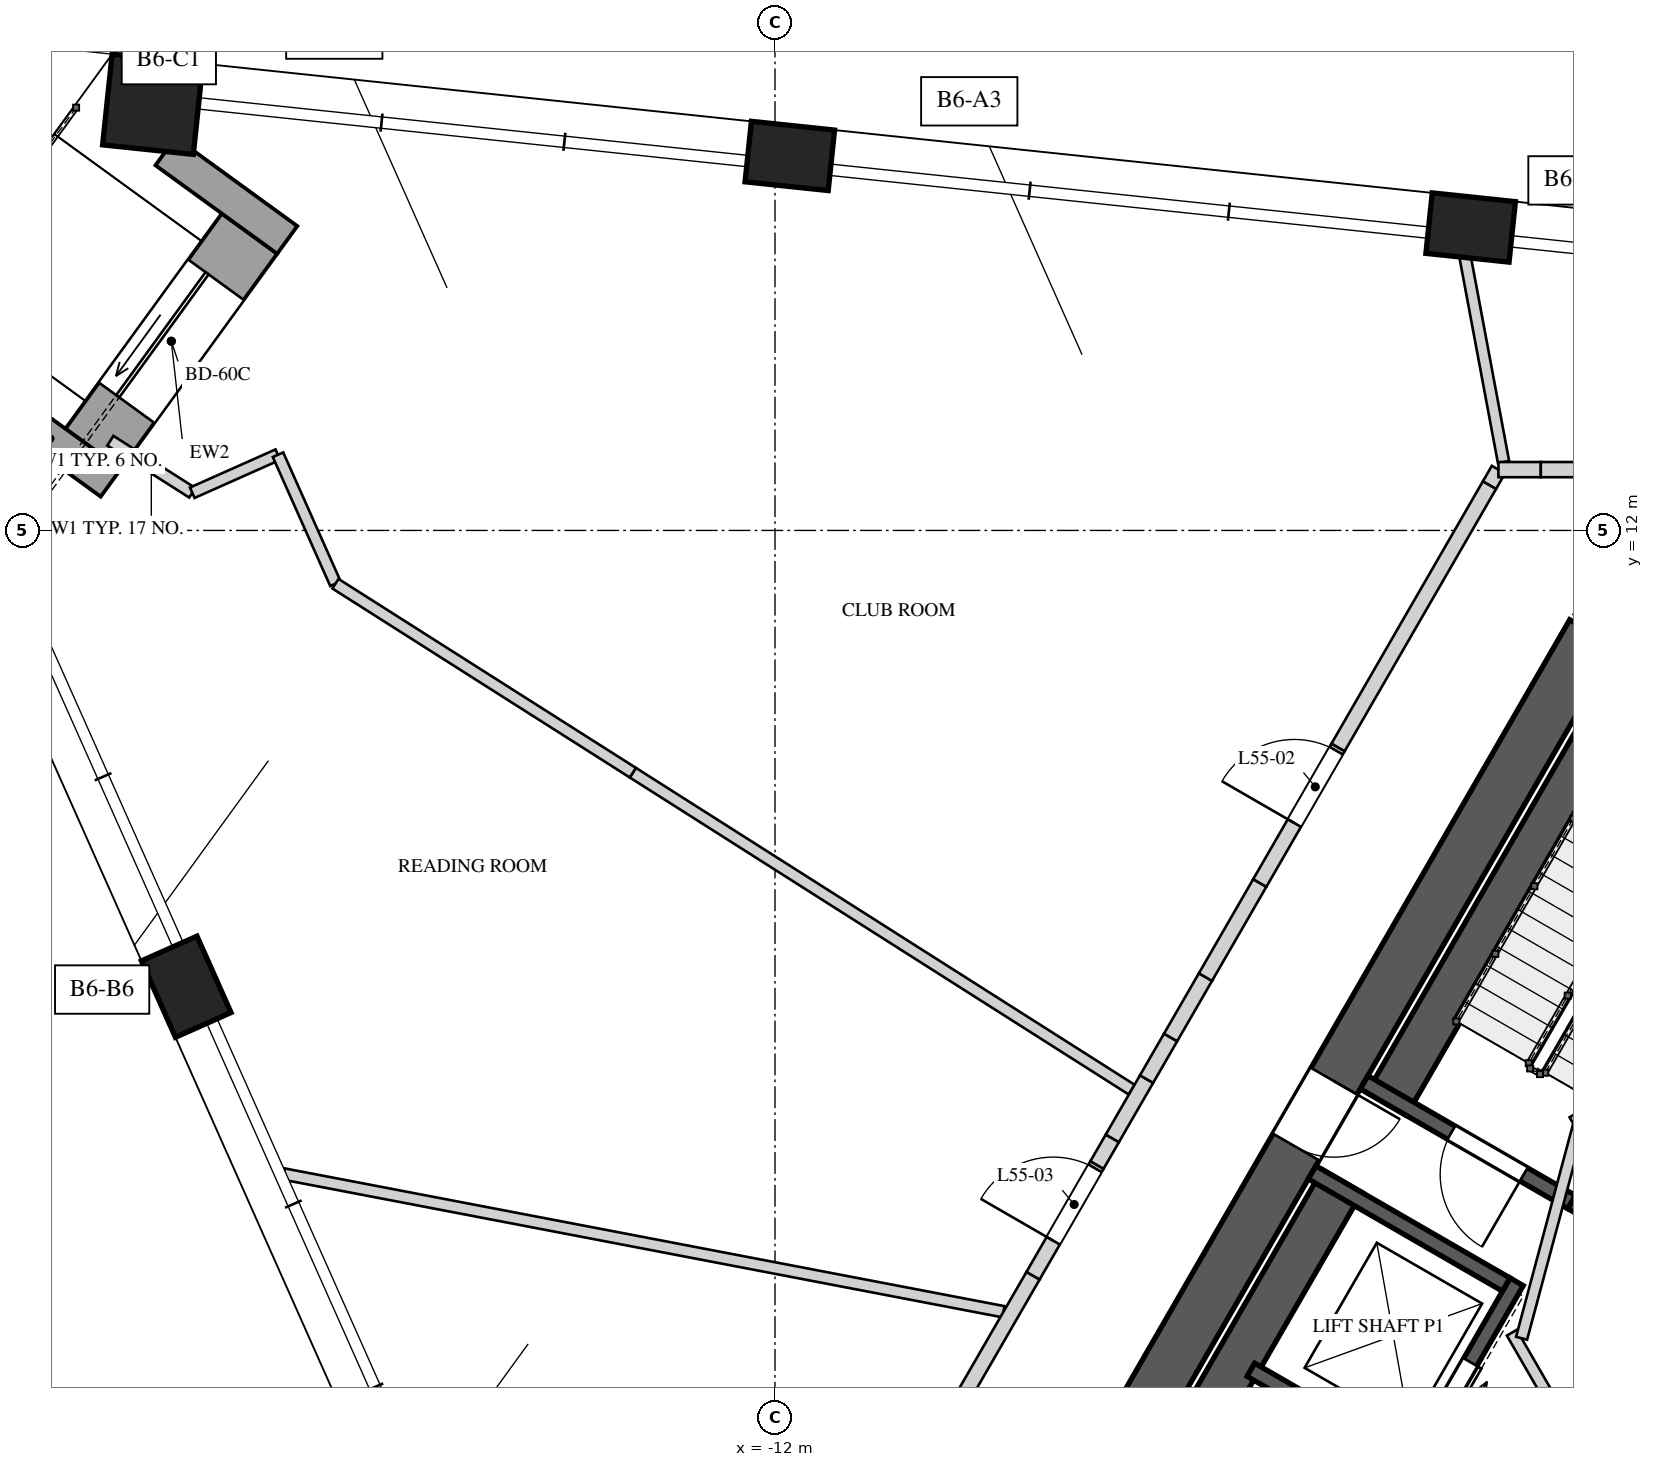
"""IFC4 building model, lengths in metres.
Left out: names, types, materials, properties, quantities, classifications, styles, units other than length and angle.
Written with IfcOpenShell. Run it as: python <this file> out.ifc"""

import sys

from ifc_helpers import new_model, si_unit, direction, frame, frame_2d, origin, origin_2d, place, context, subcontext, project, spatial, polyline, rectangle, outline, extrude, element, fill, save


model = new_model("IFC4")
c1 = context("Model", 3, precision=1e-05, world=origin(), true_north=direction((0.0, 1.0)))
c2 = subcontext(c1, "Body", "Model", "MODEL_VIEW")
j1 = project(units=[si_unit("LENGTHUNIT", "METRE"), si_unit("PLANEANGLEUNIT", "RADIAN")], contexts=[c1])
p1 = place(None, origin())
s1 = spatial("IfcSite", under=j1, at=p1, CompositionType="ELEMENT")
p2 = place(p1, origin())
s2 = spatial("IfcBuilding", under=s1, at=p2, CompositionType="ELEMENT")
p3 = place(p2, frame((0.0, 0.0, 237.2)))
s3 = spatial("IfcBuildingStorey", under=s2, at=p3, CompositionType="ELEMENT", Elevation=237.2)
p4 = place(p3, frame((-1.241, 10.65, 0.0), z_axis=(0.0, 0.0, 1.0), x_axis=(-0.500003331888, -0.866023480109, 0.0)))
e1 = element("IfcWall", 1, at=p4, inside=s3, PredefinedType="SHEAR", context=c2, shape_type="SweptSolid", body=[
    extrude(rectangle(XDim=17.205, YDim=0.7, at=frame_2d((8.603, 0.0))), origin(), (0.0, 0.0, 1.0), 4.0),
])
p5 = place(p4, frame((6.808, 0.0, 0.0)))
e2 = element("IfcOpeningElement", 2, at=p5, cuts=e1, PredefinedType="OPENING", context=c2, shape_type="SweptSolid", body=[
    extrude(rectangle(XDim=1.0, YDim=2.4, at=frame_2d((0.5, 1.2))), frame((0.0, 0.36, 0.0), z_axis=(0.0, -1.0, 0.0), x_axis=(1.0, 0.0, 0.0)), (0.0, 0.0, 1.0), 0.72),
])
p6 = place(p4, frame((14.922, 0.0, 0.0)))
e3 = element("IfcOpeningElement", 3, at=p6, cuts=e1, PredefinedType="OPENING", context=c2, shape_type="SweptSolid", body=[
    extrude(rectangle(XDim=0.8, YDim=2.1, at=frame_2d((0.4, 1.05))), frame((0.0, 0.36, 0.0), z_axis=(0.0, -1.0, 0.0), x_axis=(1.0, 0.0, 0.0)), (0.0, 0.0, 1.0), 0.72),
])
for number, where, z_axis, x_axis in (
    (4, (-19.746, 5.997, -0.35), (0.0, 0.0, 1.0), (0.407, -0.914, 0.0)),
    (5, (-2.848, 15.985, -0.35), (0.0, 0.0, 1.0), (-0.995, 0.105, 0.0)),
    (6, (-11.805, 16.927, -0.35), (0.0, 0.0, 1.0), (-0.995, 0.105, 0.0)),
):
    element("IfcColumn", number, at=place(p3, frame(where, z_axis=z_axis, x_axis=x_axis)), inside=s3, PredefinedType="COLUMN", context=c2, shape_type="SweptSolid", body=[
        extrude(rectangle(XDim=1.1, YDim=0.8, at=origin_2d()), origin(), (0.0, 0.0, 1.0), 4.35),
    ])
p7 = place(p3, frame((-20.187, 17.606, -0.35), z_axis=(0.0, 0.0, 1.0), x_axis=(-0.994521895368, 0.104528463268, 0.0)))
e7 = element("IfcColumn", 7, at=p7, inside=s3, PredefinedType="COLUMN", context=c2, shape_type="SweptSolid", body=[
    extrude(rectangle(XDim=1.2, YDim=1.2, at=origin_2d()), origin(), (0.0, 0.0, 1.0), 4.35),
])
p8 = place(p3, frame((-20.971, 13.073, 0.0), z_axis=(0.0, 0.0, 1.0), x_axis=(0.587810807352, 0.808998426921, 0.0)))
e8 = element("IfcWall", 8, at=p8, inside=s3, PredefinedType="SOLIDWALL", context=c2, shape_type="SweptSolid", body=[
    extrude(rectangle(XDim=3.5, YDim=0.9, at=frame_2d((1.75, 0.0))), origin(), (0.0, 0.0, 1.0), 3.3),
])
p9 = place(p8, frame((0.75, 0.0, 0.0)))
e9 = element("IfcOpeningElement", 9, at=p9, cuts=e8, PredefinedType="OPENING", context=c2, shape_type="SweptSolid", body=[
    extrude(rectangle(XDim=2.0, YDim=2.4, at=frame_2d((1.0, 1.2))), frame((0.0, 0.46, 0.0), z_axis=(0.0, -1.0, 0.0), x_axis=(1.0, 0.0, 0.0)), (0.0, 0.0, 1.0), 0.92),
])
for number, where, z_axis, x_axis in (
    (10, (-22.34, 13.79, 0.0), (0.0, 0.0, 1.0), (0.809, -0.588, 0.0)),
    (11, (-20.019, 16.986, 0.0), (0.0, 0.0, 1.0), (0.809, -0.588, 0.0)),
):
    element("IfcWall", number, at=place(p3, frame(where, z_axis=z_axis, x_axis=x_axis)), inside=s3, PredefinedType="SOLIDWALL", context=c2, shape_type="SweptSolid", body=[
        extrude(rectangle(XDim=1.979, YDim=0.45, at=frame_2d((0.99, 0.0))), origin(), (0.0, 0.0, 1.0), 2.55),
    ])
p10 = place(p3, frame((-0.853, 9.823, 0.0), z_axis=(0.0, 0.0, 1.0), x_axis=(-0.500009909098, -0.866019682689, 0.0)))
e12 = element("IfcWall", 12, at=p10, inside=s3, PredefinedType="SOLIDWALL", context=c2, shape_type="SweptSolid", body=[
    extrude(rectangle(XDim=6.2, YDim=0.6, at=frame_2d((3.1, 0.0))), origin(), (0.0, 0.0, 1.0), 3.65),
])
p11 = place(p3, frame((1.876, 8.85, 0.0), z_axis=(0.0, 0.0, 1.0), x_axis=(-0.499998042495, -0.866026533947, 0.0)))
e13 = element("IfcWall", 13, at=p11, inside=s3, PredefinedType="SOLIDWALL", context=c2, shape_type="SweptSolid", body=[
    extrude(rectangle(XDim=6.723, YDim=0.2, at=frame_2d((3.361, 0.0))), origin(), (0.0, 0.0, 1.0), 3.65),
])
p12 = place(p3, frame((-1.521, 3.165, 0.0), z_axis=(0.0, 0.0, 1.0), x_axis=(-0.866035871367, 0.499981869177, 0.0)))
e14 = element("IfcWall", 14, at=p12, inside=s3, PredefinedType="SOLIDWALL", context=c2, shape_type="SweptSolid", body=[
    extrude(rectangle(XDim=3.15, YDim=0.2, at=frame_2d((1.575, 0.0))), origin(), (0.0, 0.0, 1.0), 3.65),
])
p13 = place(p12, frame((0.725, 0.0, 0.0)))
e15 = element("IfcOpeningElement", 15, at=p13, cuts=e14, PredefinedType="OPENING", context=c2, shape_type="SweptSolid", body=[
    extrude(rectangle(XDim=1.1, YDim=2.4, at=frame_2d((0.55, 1.2))), frame((0.0, 0.11, 0.0), z_axis=(0.0, -1.0, 0.0), x_axis=(1.0, 0.0, 0.0)), (0.0, 0.0, 1.0), 0.22),
])
p14 = place(p3, frame((-2.243, 2.115, 0.0), z_axis=(0.0, 0.0, 1.0), x_axis=(-0.499996545922, -0.866027397988, 0.0)))
e16 = element("IfcWall", 16, at=p14, inside=s3, PredefinedType="SOLIDWALL", context=c2, shape_type="SweptSolid", body=[
    extrude(rectangle(XDim=5.5, YDim=0.2, at=frame_2d((2.75, 0.0))), origin(), (0.0, 0.0, 1.0), 3.65),
])
p15 = place(p14, frame((1.22, 0.0, 0.0)))
e17 = element("IfcOpeningElement", 17, at=p15, cuts=e16, PredefinedType="OPENING", context=c2, shape_type="SweptSolid", body=[
    extrude(rectangle(XDim=1.1, YDim=2.1, at=frame_2d((0.55, 1.05))), frame((0.0, 0.11, 0.0), z_axis=(0.0, -1.0, 0.0), x_axis=(1.0, 0.0, 0.0)), (0.0, 0.0, 1.0), 0.22),
])
p16 = place(p14, frame((3.525, 0.0, 0.0)))
e18 = element("IfcOpeningElement", 18, at=p16, cuts=e16, PredefinedType="OPENING", context=c2, shape_type="SweptSolid", body=[
    extrude(rectangle(XDim=1.1, YDim=2.1, at=frame_2d((0.55, 1.05))), frame((0.0, 0.11, 0.0), z_axis=(0.0, -1.0, 0.0), x_axis=(1.0, 0.0, 0.0)), (0.0, 0.0, 1.0), 0.22),
])
p17 = place(p3, frame((-4.538, 3.44, 0.0), z_axis=(0.0, 0.0, 1.0), x_axis=(-0.499996545922, -0.866027397988, 0.0)))
e19 = element("IfcWall", 19, at=p17, inside=s3, PredefinedType="SOLIDWALL", context=c2, shape_type="SweptSolid", body=[
    extrude(rectangle(XDim=5.5, YDim=0.6, at=frame_2d((2.75, 0.0))), origin(), (0.0, 0.0, 1.0), 3.65),
])
p18 = place(p3, frame((-2.38, 2.078, 0.0), z_axis=(0.0, 0.0, 1.0), x_axis=(-0.866060182126, 0.499939757307, 0.0)))
e20 = element("IfcWall", 20, at=p18, inside=s3, PredefinedType="SOLIDWALL", context=c2, shape_type="SweptSolid", body=[
    extrude(rectangle(XDim=2.95, YDim=0.2, at=frame_2d((1.475, 0.0))), origin(), (0.0, 0.0, 1.0), 3.65),
])
p19 = place(p3, frame((-3.705, -0.217, 0.0), z_axis=(0.0, 0.0, 1.0), x_axis=(-0.866016039709, 0.500016218704, 0.0)))
e21 = element("IfcWall", 21, at=p19, inside=s3, PredefinedType="SOLIDWALL", context=c2, shape_type="SweptSolid", body=[
    extrude(rectangle(XDim=2.35, YDim=0.2, at=frame_2d((1.175, 0.0))), origin(), (0.0, 0.0, 1.0), 3.65),
])
p20 = place(p3, frame((-0.744, -1.261, 0.0), z_axis=(0.0, 0.0, 1.0), x_axis=(-0.500004234368, 0.866022959057, 0.0)))
e22 = element("IfcWall", 22, at=p20, inside=s3, PredefinedType="PARTITIONING", context=c2, shape_type="SweptSolid", body=[
    extrude(rectangle(XDim=3.125, YDim=0.15, at=frame_2d((1.562, 0.0))), origin(), (0.0, 0.0, 1.0), 3.65),
])
p21 = place(p20, frame((1.05, 0.0, 0.0)))
e23 = element("IfcOpeningElement", 23, at=p21, cuts=e22, PredefinedType="OPENING", context=c2, shape_type="SweptSolid", body=[
    extrude(rectangle(XDim=1.1, YDim=2.4, at=frame_2d((0.55, 1.2))), frame((0.0, 0.085, 0.0), z_axis=(0.0, -1.0, 0.0), x_axis=(1.0, 0.0, 0.0)), (0.0, 0.0, 1.0), 0.17),
])
p22 = place(p3, frame((-2.178, 1.372, 0.0), z_axis=(0.0, 0.0, 1.0), x_axis=(0.258808958833, 0.96592852884, 0.0)))
e24 = element("IfcWall", 24, at=p22, inside=s3, PredefinedType="PARTITIONING", context=c2, shape_type="SweptSolid", body=[
    extrude(rectangle(XDim=2.903, YDim=0.15, at=frame_2d((1.451, 0.0))), origin(), (0.0, 0.0, 1.0), 3.65),
])
p23 = place(p3, frame((-1.51, 4.215, 0.0), z_axis=(0.0, 0.0, 1.0), x_axis=(0.866085525409, 0.49989585183, 0.0)))
e25 = element("IfcWall", 25, at=p23, inside=s3, PredefinedType="PARTITIONING", context=c2, shape_type="SweptSolid", body=[
    extrude(rectangle(XDim=1.3, YDim=0.15, at=frame_2d((0.65, 0.0))), origin(), (0.0, 0.0, 1.0), 3.65),
])
p24 = place(p3, frame((-19.667, 12.496, 0.0), z_axis=(0.0, 0.0, 1.0), x_axis=(-0.844054864629, 0.536256827924, 0.0)))
e26 = element("IfcWall", 26, at=p24, inside=s3, PredefinedType="PARTITIONING", context=c2, shape_type="SweptSolid", body=[
    extrude(rectangle(XDim=1.277, YDim=0.15, at=frame_2d((0.639, 0.0))), origin(), (0.0, 0.0, 1.0), 3.65),
])
p25 = place(p3, frame((-18.541, 12.997, 0.0), z_axis=(0.0, 0.0, 1.0), x_axis=(-0.913582584013, -0.406653245639, 0.0)))
e27 = element("IfcWall", 27, at=p25, inside=s3, PredefinedType="PARTITIONING", context=c2, shape_type="SweptSolid", body=[
    extrude(rectangle(XDim=1.232, YDim=0.15, at=frame_2d((0.616, 0.0))), origin(), (0.0, 0.0, 1.0), 3.65),
])
p26 = place(p3, frame((-17.783, 11.299, 0.0), z_axis=(0.0, 0.0, 1.0), x_axis=(-0.406809110969, 0.913513189414, 0.0)))
e28 = element("IfcWall", 28, at=p26, inside=s3, PredefinedType="PARTITIONING", context=c2, shape_type="SweptSolid", body=[
    extrude(rectangle(XDim=1.857, YDim=0.15, at=frame_2d((0.929, 0.0))), origin(), (0.0, 0.0, 1.0), 3.65),
])
p27 = place(p3, frame((-8.994, 1.721, 0.0), z_axis=(0.0, 0.0, 1.0), x_axis=(-0.982177280281, 0.187956883618, 0.0)))
e29 = element("IfcWall", 29, at=p27, inside=s3, PredefinedType="PARTITIONING", context=c2, shape_type="SweptSolid", body=[
    extrude(rectangle(XDim=9.641, YDim=0.15, at=frame_2d((4.82, 0.0))), origin(), (0.0, 0.0, 1.0), 3.65),
])
p28 = place(p3, frame((-7.308, 4.643, 0.0), z_axis=(0.0, 0.0, 1.0), x_axis=(-0.844032346695, 0.536292268947, 0.0)))
e30 = element("IfcWall", 30, at=p28, inside=s3, PredefinedType="PARTITIONING", context=c2, shape_type="SweptSolid", body=[
    extrude(rectangle(XDim=7.775, YDim=0.15, at=frame_2d((3.888, 0.0))), origin(), (0.0, 0.0, 1.0), 2.55),
])
p29 = place(p3, frame((-13.87, 8.813, 0.0), z_axis=(0.0, 0.0, 1.0), x_axis=(-0.844027785631, 0.536299447215, 0.0)))
e31 = element("IfcWall", 31, at=p29, inside=s3, PredefinedType="PARTITIONING", context=c2, shape_type="SweptSolid", body=[
    extrude(rectangle(XDim=4.636, YDim=0.15, at=frame_2d((2.318, 0.0))), origin(), (0.0, 0.0, 1.0), 3.65),
])
p30 = place(p3, frame((-2.416, 12.9, 0.0), z_axis=(0.0, 0.0, 1.0), x_axis=(-0.18402115817, 0.982922282455, 0.0)))
e32 = element("IfcWall", 32, at=p30, inside=s3, PredefinedType="PARTITIONING", context=c2, shape_type="SweptSolid", body=[
    extrude(rectangle(XDim=2.977, YDim=0.15, at=frame_2d((1.489, 0.0))), origin(), (0.0, 0.0, 1.0), 2.95),
])
p31 = place(p3, frame((-10.277, -0.7, 0.0), z_axis=(0.0, 0.0, 1.0), x_axis=(0.499987977232, 0.866032345022, 0.0)))
e33 = element("IfcWall", 33, at=p31, inside=s3, PredefinedType="SOLIDWALL", context=c2, shape_type="SweptSolid", body=[
    extrude(rectangle(XDim=3.343, YDim=0.2, at=frame_2d((1.671, 0.0))), origin(), (0.0, 0.0, 1.0), 3.65),
])
p32 = place(p3, frame((-8.605, 2.195, 0.0), z_axis=(0.0, 0.0, 1.0), x_axis=(0.499948642682, 0.866055052915, 0.0)))
e34 = element("IfcWall", 34, at=p32, inside=s3, PredefinedType="SOLIDWALL", context=c2, shape_type="SweptSolid", body=[
    extrude(outline(polyline([(0.0, 0.0), (1.682, 0.0), (1.682, 3.65), (0.821, 3.65), (0.821, 2.75), (0.0, 2.75), (0.0, 0.0)])), frame((0.0, 0.1, 0.0), z_axis=(0.0, -1.0, 0.0), x_axis=(1.0, 0.0, 0.0)), (0.0, 0.0, 1.0), 0.2),
])
p33 = place(p32, frame((0.532, 0.0, 0.0)))
e35 = element("IfcOpeningElement", 35, at=p33, cuts=e34, PredefinedType="OPENING", context=c2, shape_type="SweptSolid", body=[
    extrude(rectangle(XDim=1.1, YDim=2.4, at=frame_2d((0.55, 1.2))), frame((0.0, 0.11, 0.0), z_axis=(0.0, -1.0, 0.0), x_axis=(1.0, 0.0, 0.0)), (0.0, 0.0, 1.0), 0.22),
])
p34 = place(p3, frame((-7.764, 3.652, 0.0), z_axis=(0.0, 0.0, 1.0), x_axis=(0.500227331437, 0.865894114129, 0.0)))
e36 = element("IfcWall", 36, at=p34, inside=s3, PredefinedType="SOLIDWALL", context=c2, shape_type="SweptSolid", body=[
    extrude(rectangle(XDim=0.405, YDim=0.2, at=frame_2d((0.202, 0.0))), origin(), (0.0, 0.0, 1.0), 3.65),
])
p35 = place(p3, frame((-7.562, 4.002, 0.0), z_axis=(0.0, 0.0, 1.0), x_axis=(0.500105887137, 0.865964261186, 0.0)))
e37 = element("IfcWall", 37, at=p35, inside=s3, PredefinedType="SOLIDWALL", context=c2, shape_type="SweptSolid", body=[
    extrude(rectangle(XDim=0.9, YDim=0.2, at=frame_2d((0.45, 0.0))), origin(), (0.0, 0.0, 1.0), 2.55),
])
p36 = place(p3, frame((-7.112, 4.782, 0.0), z_axis=(0.0, 0.0, 1.0), x_axis=(0.499956208541, 0.866050685319, 0.0)))
e38 = element("IfcWall", 38, at=p36, inside=s3, PredefinedType="SOLIDWALL", context=c2, shape_type="SweptSolid", body=[
    extrude(rectangle(XDim=0.633, YDim=0.2, at=frame_2d((0.316, 0.0))), origin(), (0.0, 0.0, 1.0), 3.65),
])
p37 = place(p3, frame((-6.795, 5.33, 0.0), z_axis=(0.0, 0.0, 1.0), x_axis=(0.499975954304, 0.866039286129, 0.0)))
e39 = element("IfcWall", 39, at=p37, inside=s3, PredefinedType="SOLIDWALL", context=c2, shape_type="SweptSolid", body=[
    extrude(rectangle(XDim=0.917, YDim=0.2, at=frame_2d((0.458, 0.0))), origin(), (0.0, 0.0, 1.0), 2.55),
])
p38 = place(p3, frame((-6.337, 6.124, 0.0), z_axis=(0.0, 0.0, 1.0), x_axis=(0.499904796234, 0.866080362727, 0.0)))
e40 = element("IfcWall", 40, at=p38, inside=s3, PredefinedType="SOLIDWALL", context=c2, shape_type="SweptSolid", body=[
    extrude(rectangle(XDim=1.429, YDim=0.2, at=frame_2d((0.715, 0.0))), origin(), (0.0, 0.0, 1.0), 3.65),
])
p39 = place(p3, frame((-5.622, 7.362, 0.0), z_axis=(0.0, 0.0, 1.0), x_axis=(0.50006436408, 0.865988239976, 0.0)))
e41 = element("IfcWall", 41, at=p39, inside=s3, PredefinedType="SOLIDWALL", context=c2, shape_type="SweptSolid", body=[
    extrude(outline(polyline([(0.0, 0.0), (2.06, 0.0), (2.06, 3.65), (0.884, 3.65), (0.884, 2.75), (0.0, 2.75), (0.0, 0.0)])), frame((0.0, 0.1, 0.0), z_axis=(0.0, -1.0, 0.0), x_axis=(1.0, 0.0, 0.0)), (0.0, 0.0, 1.0), 0.2),
])
p40 = place(p39, frame((0.91, 0.0, 0.0)))
e42 = element("IfcOpeningElement", 42, at=p40, cuts=e41, PredefinedType="OPENING", context=c2, shape_type="SweptSolid", body=[
    extrude(rectangle(XDim=1.1, YDim=2.4, at=frame_2d((0.55, 1.2))), frame((0.0, 0.11, 0.0), z_axis=(0.0, -1.0, 0.0), x_axis=(1.0, 0.0, 0.0)), (0.0, 0.0, 1.0), 0.22),
])
p41 = place(p3, frame((-4.592, 9.146, 0.0), z_axis=(0.0, 0.0, 1.0), x_axis=(0.499987651691, 0.866032532966, 0.0)))
e43 = element("IfcWall", 43, at=p41, inside=s3, PredefinedType="SOLIDWALL", context=c2, shape_type="SweptSolid", body=[
    extrude(rectangle(XDim=3.984, YDim=0.2, at=frame_2d((1.992, 0.0))), origin(), (0.0, 0.0, 1.0), 3.65),
])
p42 = place(p3, frame((-2.6, 12.597, 0.0), z_axis=(0.0, 0.0, 1.0), x_axis=(0.49972245349, 0.866185586049, 0.0)))
e44 = element("IfcWall", 44, at=p42, inside=s3, PredefinedType="SOLIDWALL", context=c2, shape_type="SweptSolid", body=[
    extrude(rectangle(XDim=0.235, YDim=0.2, at=frame_2d((0.117, 0.0))), origin(), (0.0, 0.0, 1.0), 2.95),
])
p43 = place(p3, frame((-2.483, 12.8, 0.0), z_axis=(0.0, 0.0, 1.0), x_axis=(1.0, 0.0, 0.0)))
e45 = element("IfcWall", 45, at=p43, inside=s3, PredefinedType="SOLIDWALL", context=c2, shape_type="SweptSolid", body=[
    extrude(rectangle(XDim=0.558, YDim=0.2, at=frame_2d((0.279, 0.0))), origin(), (0.0, 0.0, 1.0), 2.95),
])
p44 = place(p3, frame((-1.925, 12.8, 0.0), z_axis=(0.0, 0.0, 1.0), x_axis=(1.0, 0.0, 0.0)))
e46 = element("IfcWall", 46, at=p44, inside=s3, PredefinedType="SOLIDWALL", context=c2, shape_type="SweptSolid", body=[
    extrude(rectangle(XDim=4.408, YDim=0.2, at=frame_2d((2.204, 0.0))), origin(), (0.0, 0.0, 1.0), 3.65),
])
p45 = place(p9, origin())
e47 = element("IfcDoor", 47, at=p45, inside=s3, OperationType="SLIDING_TO_LEFT", PredefinedType="DOOR", context=c2, shape_type="SweptSolid", body=[
    extrude(rectangle(XDim=2.0, YDim=2.4, at=frame_2d((1.0, 1.2))), frame((0.0, 0.025, 0.0), z_axis=(0.0, -1.0, 0.0), x_axis=(1.0, 0.0, 0.0)), (0.0, 0.0, 1.0), 0.05),
])
fill(e9, e47)
p46 = place(p13, origin())
e48 = element("IfcDoor", 48, at=p46, inside=s3, OperationType="SINGLE_SWING_RIGHT", PredefinedType="DOOR", context=c2, shape_type="SweptSolid", body=[
    extrude(rectangle(XDim=1.1, YDim=2.4, at=frame_2d((0.55, 1.2))), frame((0.0, 0.025, 0.0), z_axis=(0.0, -1.0, 0.0), x_axis=(1.0, 0.0, 0.0)), (0.0, 0.0, 1.0), 0.05),
])
fill(e15, e48)
p47 = place(p15, origin())
e49 = element("IfcDoor", 49, at=p47, inside=s3, OperationType="SLIDING_TO_LEFT", PredefinedType="DOOR", context=c2, shape_type="SweptSolid", body=[
    extrude(rectangle(XDim=1.1, YDim=2.1, at=frame_2d((0.55, 1.05))), frame((0.0, 0.025, 0.0), z_axis=(0.0, -1.0, 0.0), x_axis=(1.0, 0.0, 0.0)), (0.0, 0.0, 1.0), 0.05),
])
fill(e17, e49)
p48 = place(p5, origin())
e50 = element("IfcDoor", 50, at=p48, inside=s3, OperationType="SINGLE_SWING_RIGHT", PredefinedType="DOOR", context=c2, shape_type="SweptSolid", body=[
    extrude(rectangle(XDim=1.0, YDim=2.4, at=frame_2d((0.5, 1.2))), frame((0.0, 0.025, 0.0), z_axis=(0.0, -1.0, 0.0), x_axis=(1.0, 0.0, 0.0)), (0.0, 0.0, 1.0), 0.05),
])
fill(e2, e50)
p49 = place(p40, origin())
e51 = element("IfcDoor", 51, at=p49, inside=s3, OperationType="SINGLE_SWING_RIGHT", PredefinedType="DOOR", context=c2, shape_type="SweptSolid", body=[
    extrude(rectangle(XDim=1.1, YDim=2.4, at=frame_2d((0.55, 1.2))), frame((0.0, 0.025, 0.0), z_axis=(0.0, -1.0, 0.0), x_axis=(1.0, 0.0, 0.0)), (0.0, 0.0, 1.0), 0.05),
])
fill(e42, e51)
p50 = place(p33, origin())
e52 = element("IfcDoor", 52, at=p50, inside=s3, OperationType="SINGLE_SWING_LEFT", PredefinedType="DOOR", context=c2, shape_type="SweptSolid", body=[
    extrude(rectangle(XDim=1.1, YDim=2.4, at=frame_2d((0.55, 1.2))), frame((0.0, 0.025, 0.0), z_axis=(0.0, -1.0, 0.0), x_axis=(1.0, 0.0, 0.0)), (0.0, 0.0, 1.0), 0.05),
])
fill(e35, e52)
save(model, sys.argv[1])
